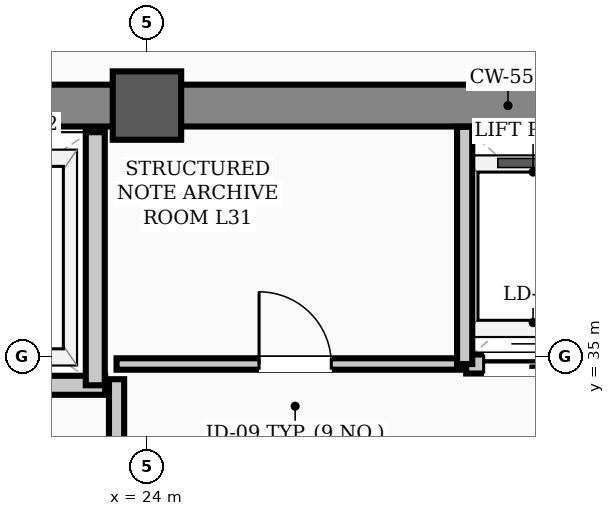
"""IFC4 building model, lengths in metres.
Left out: names, types, materials, properties, quantities, classifications, styles, units other than length and angle.
Written with IfcOpenShell. Run it as: python <this file> out.ifc"""

import sys

from ifc_helpers import new_model, si_unit, direction, frame, frame_2d, origin, origin_2d, place, context, subcontext, project, spatial, rectangle, hollow_rectangle, extrude, element, fill, save


model = new_model("IFC4")
c1 = context("Model", 3, precision=1e-05, world=origin(), true_north=direction((0.0, 1.0)))
c2 = subcontext(c1, "Body", "Model", "MODEL_VIEW")
j1 = project(units=[si_unit("LENGTHUNIT", "METRE"), si_unit("PLANEANGLEUNIT", "RADIAN")], contexts=[c1])
p1 = place(None, origin())
s1 = spatial("IfcSite", under=j1, at=p1, CompositionType="ELEMENT")
p2 = place(p1, origin())
s2 = spatial("IfcBuilding", under=s1, at=p2, CompositionType="ELEMENT")
p3 = place(p2, frame((0.0, 0.0, 126.6)))
s3 = spatial("IfcBuildingStorey", under=s2, at=p3, CompositionType="ELEMENT", Elevation=126.6)
p4 = place(p3, frame((24.0, 38.3, 0.0), z_axis=(0.0, 0.0, 1.0), x_axis=(1.0, 0.0, 0.0)))
e1 = element("IfcColumn", 1, at=p4, inside=s3, PredefinedType="COLUMN", context=c2, shape_type="SweptSolid", body=[
    extrude(hollow_rectangle(XDim=0.9, YDim=0.9, WallThickness=0.035, InnerFilletRadius=0.017, OuterFilletRadius=0.052, at=origin_2d()), origin(), (0.0, 0.0, 1.0), 3.9),
])
p5 = place(p3, frame((13.5, 38.3, 0.0), z_axis=(0.0, 0.0, 1.0), x_axis=(1.0, 0.0, 0.0)))
e2 = element("IfcWall", 2, at=p5, inside=s3, PredefinedType="SHEAR", context=c2, shape_type="SweptSolid", body=[
    extrude(rectangle(XDim=30.5, YDim=0.55, at=frame_2d((15.25, 0.0))), origin(), (0.0, 0.0, 1.0), 3.72),
])
p6 = place(p3, frame((18.1, 34.62, 0.0), z_axis=(0.0, 0.0, 1.0), x_axis=(1.0, 0.0, 0.0)))
e3 = element("IfcWall", 3, at=p6, inside=s3, PredefinedType="STANDARD", context=c2, shape_type="SweptSolid", body=[
    extrude(rectangle(XDim=5.35, YDim=0.25, at=frame_2d((2.675, 0.0))), origin(), (0.0, 0.0, 1.0), 3.72),
])
p7 = place(p6, frame((0.85, 0.0, 0.0)))
e4 = element("IfcOpeningElement", 4, at=p7, cuts=e3, PredefinedType="OPENING", context=c2, shape_type="SweptSolid", body=[
    extrude(rectangle(XDim=1.1, YDim=2.08, at=frame_2d((0.55, 1.04))), frame((0.0, 0.135, 0.0), z_axis=(0.0, -1.0, 0.0), x_axis=(1.0, 0.0, 0.0)), (0.0, 0.0, 1.0), 0.27),
])
p8 = place(p6, frame((3.45, 0.0, 0.0)))
e5 = element("IfcOpeningElement", 5, at=p8, cuts=e3, PredefinedType="OPENING", context=c2, shape_type="SweptSolid", body=[
    extrude(rectangle(XDim=1.1, YDim=2.08, at=frame_2d((0.55, 1.04))), frame((0.0, 0.135, 0.0), z_axis=(0.0, -1.0, 0.0), x_axis=(1.0, 0.0, 0.0)), (0.0, 0.0, 1.0), 0.27),
])
p9 = place(p3, frame((23.32, 34.62, 0.0), z_axis=(0.0, 0.0, 1.0), x_axis=(0.0, 1.0, 0.0)))
e6 = element("IfcWall", 6, at=p9, inside=s3, PredefinedType="STANDARD", context=c2, shape_type="SweptSolid", body=[
    extrude(rectangle(XDim=3.33, YDim=0.25, at=frame_2d((1.665, 0.0))), origin(), (0.0, 0.0, 1.0), 3.72),
])
p10 = place(p3, frame((28.2, 34.9, 0.0), z_axis=(0.0, 0.0, 1.0), x_axis=(1.0, 0.0, 0.0)))
e7 = element("IfcWall", 7, at=p10, inside=s3, PredefinedType="STANDARD", context=c2, shape_type="SweptSolid", body=[
    extrude(rectangle(XDim=3.55, YDim=0.25, at=frame_2d((1.775, 0.0))), origin(), (0.0, 0.0, 1.0), 3.72),
])
p11 = place(p10, frame((0.23, 0.0, 0.0)))
e8 = element("IfcOpeningElement", 8, at=p11, cuts=e7, PredefinedType="OPENING", context=c2, shape_type="SweptSolid", body=[
    extrude(rectangle(XDim=1.3, YDim=2.08, at=frame_2d((0.65, 1.04))), frame((0.0, 0.135, 0.0), z_axis=(0.0, -1.0, 0.0), x_axis=(1.0, 0.0, 0.0)), (0.0, 0.0, 1.0), 0.27),
])
p12 = place(p10, frame((2.03, 0.0, 0.0)))
e9 = element("IfcOpeningElement", 9, at=p12, cuts=e7, PredefinedType="OPENING", context=c2, shape_type="SweptSolid", body=[
    extrude(rectangle(XDim=1.3, YDim=2.08, at=frame_2d((0.65, 1.04))), frame((0.0, 0.135, 0.0), z_axis=(0.0, -1.0, 0.0), x_axis=(1.0, 0.0, 0.0)), (0.0, 0.0, 1.0), 0.27),
])
p13 = place(p3, frame((23.6, 34.9, 0.0), z_axis=(0.0, 0.0, 1.0), x_axis=(1.0, 0.0, 0.0)))
e10 = element("IfcWall", 10, at=p13, inside=s3, PredefinedType="PARTITIONING", context=c2, shape_type="SweptSolid", body=[
    extrude(rectangle(XDim=4.58, YDim=0.15, at=frame_2d((2.29, 0.0))), origin(), (0.0, 0.0, 1.0), 3.72),
])
p14 = place(p13, frame((1.875, 0.0, 0.0)))
e11 = element("IfcOpeningElement", 11, at=p14, cuts=e10, PredefinedType="OPENING", context=c2, shape_type="SweptSolid", body=[
    extrude(rectangle(XDim=0.95, YDim=2.08, at=frame_2d((0.475, 1.04))), frame((0.0, 0.085, 0.0), z_axis=(0.0, -1.0, 0.0), x_axis=(1.0, 0.0, 0.0)), (0.0, 0.0, 1.0), 0.17),
])
p15 = place(p3, frame((23.6, 29.285, 0.0), z_axis=(0.0, 0.0, 1.0), x_axis=(0.0, 1.0, 0.0)))
e12 = element("IfcWall", 12, at=p15, inside=s3, PredefinedType="STANDARD", context=c2, shape_type="SweptSolid", body=[
    extrude(rectangle(XDim=5.415, YDim=0.2, at=frame_2d((2.708, 0.0))), origin(), (0.0, 0.0, 1.0), 3.1),
])
p16 = place(p3, frame((28.18, 34.9, 0.0), z_axis=(0.0, 0.0, 1.0), x_axis=(0.0, 1.0, 0.0)))
e13 = element("IfcWall", 13, at=p16, inside=s3, PredefinedType="STANDARD", context=c2, shape_type="SweptSolid", body=[
    extrude(rectangle(XDim=3.12, YDim=0.2, at=frame_2d((1.56, 0.0))), origin(), (0.0, 0.0, 1.0), 3.72),
])
p17 = place(p14, origin())
e14 = element("IfcDoor", 14, at=p17, inside=s3, OperationType="SINGLE_SWING_LEFT", PredefinedType="DOOR", context=c2, shape_type="SweptSolid", body=[
    extrude(rectangle(XDim=0.95, YDim=2.08, at=frame_2d((0.475, 1.04))), frame((0.0, 0.025, 0.0), z_axis=(0.0, -1.0, 0.0), x_axis=(1.0, 0.0, 0.0)), (0.0, 0.0, 1.0), 0.05),
])
fill(e11, e14)
p18 = place(p11, origin())
e15 = element("IfcDoor", 15, at=p18, inside=s3, OperationType="DOUBLE_DOOR_SLIDING", PredefinedType="DOOR", context=c2, shape_type="SweptSolid", body=[
    extrude(rectangle(XDim=1.3, YDim=2.08, at=frame_2d((0.65, 1.04))), frame((0.0, 0.025, 0.0), z_axis=(0.0, -1.0, 0.0), x_axis=(1.0, 0.0, 0.0)), (0.0, 0.0, 1.0), 0.05),
])
fill(e8, e15)
save(model, sys.argv[1])
